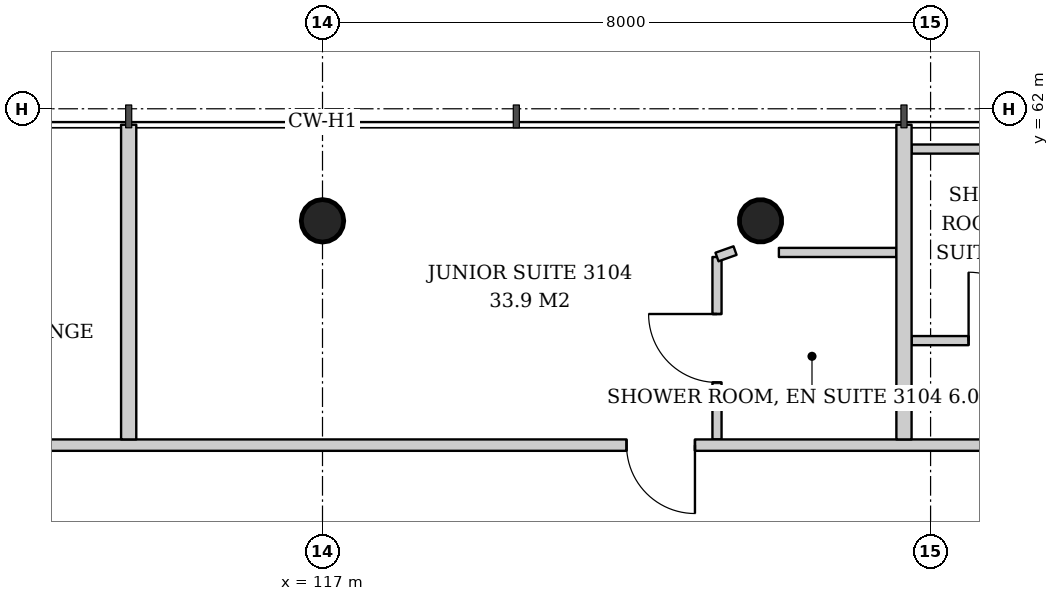
"""IFC4 building model, lengths in metres.
Left out: names, types, materials, properties, quantities, classifications, styles, units other than length and angle.
Written with IfcOpenShell. Run it as: python <this file> out.ifc"""

import sys

from ifc_helpers import new_model, si_unit, direction, frame, frame_2d, origin, origin_2d, place, context, subcontext, project, spatial, rectangle, hollow_circle, extrude, element, fill, save


model = new_model("IFC4")
c1 = context("Model", 3, precision=1e-05, world=origin(), true_north=direction((0.0, 1.0)))
c2 = subcontext(c1, "Body", "Model", "MODEL_VIEW")
j1 = project(units=[si_unit("LENGTHUNIT", "METRE"), si_unit("PLANEANGLEUNIT", "RADIAN")], contexts=[c1])
p1 = place(None, origin())
s1 = spatial("IfcSite", under=j1, at=p1, CompositionType="ELEMENT")
p2 = place(p1, origin())
s2 = spatial("IfcBuilding", under=s1, at=p2, CompositionType="ELEMENT")
p3 = place(p2, frame((0.0, 0.0, 123.6)))
s3 = spatial("IfcBuildingStorey", under=s2, at=p3, CompositionType="ELEMENT", Elevation=123.6)
p4 = place(p3, frame((122.789, 60.578, 0.0), z_axis=(-0.021563230905, -0.043062285527, 0.998839660125), x_axis=(0.894160516368, -0.44774654769, 0.0)))
e1 = element("IfcColumn", 1, at=p4, inside=s3, PredefinedType="COLUMN", context=c2, shape_type="SweptSolid", body=[
    extrude(hollow_circle(Radius=0.28, WallThickness=0.02, at=origin_2d()), origin(), (0.0, 0.0, 1.0), 3.804),
])
p5 = place(p3, frame((117.0, 60.578, 0.0), z_axis=(0.0, -0.043072300418, 0.999071957837), x_axis=(1.0, 0.0, 0.0)))
e2 = element("IfcColumn", 2, at=p5, inside=s3, PredefinedType="COLUMN", context=c2, shape_type="SweptSolid", body=[
    extrude(hollow_circle(Radius=0.28, WallThickness=0.02, at=origin_2d()), origin(), (0.0, 0.0, 1.0), 3.803),
])
p6 = place(p3, frame((124.75, 58.95, 0.0), z_axis=(0.0, 0.0, 1.0), x_axis=(1.0, 0.0, 0.0)))
e3 = element("IfcWall", 3, at=p6, inside=s3, PredefinedType="PARTITIONING", context=c2, shape_type="SweptSolid", body=[
    extrude(rectangle(XDim=2.58, YDim=0.12, at=frame_2d((1.29, 0.0))), origin(), (0.0, 0.0, 1.0), 2.9),
])
p7 = place(p6, frame((0.75, 0.0, 0.0)))
e4 = element("IfcOpeningElement", 4, at=p7, cuts=e3, PredefinedType="OPENING", context=c2, shape_type="SweptSolid", body=[
    extrude(rectangle(XDim=0.9, YDim=2.1, at=frame_2d((0.45, 1.05))), frame((0.0, 0.07, 0.0), z_axis=(0.0, -1.0, 0.0), x_axis=(1.0, 0.0, 0.0)), (0.0, 0.0, 1.0), 0.14),
])
p8 = place(p3, frame((124.75, 61.47, 0.0), z_axis=(0.0, 0.0, 1.0), x_axis=(1.0, 0.0, 0.0)))
e5 = element("IfcWall", 5, at=p8, inside=s3, PredefinedType="PARTITIONING", context=c2, shape_type="SweptSolid", body=[
    extrude(rectangle(XDim=2.58, YDim=0.12, at=frame_2d((1.29, 0.0))), origin(), (0.0, 0.0, 1.0), 3.6),
])
p9 = place(p3, frame((124.55, 60.11, 0.0), z_axis=(0.0, 0.0, 1.0), x_axis=(-1.0, 0.0, 0.0)))
e6 = element("IfcWall", 6, at=p9, inside=s3, PredefinedType="PARTITIONING", context=c2, shape_type="SweptSolid", body=[
    extrude(rectangle(XDim=1.546, YDim=0.12, at=frame_2d((0.773, 0.0))), origin(), (0.0, 0.0, 1.0), 3.6),
])
p10 = place(p3, frame((122.19, 57.65, 0.0), z_axis=(0.0, 0.0, 1.0), x_axis=(0.0, 1.0, 0.0)))
e7 = element("IfcWall", 7, at=p10, inside=s3, PredefinedType="PARTITIONING", context=c2, shape_type="SweptSolid", body=[
    extrude(rectangle(XDim=2.4, YDim=0.12, at=frame_2d((1.2, 0.0))), origin(), (0.0, 0.0, 1.0), 3.0),
])
p11 = place(p10, frame((0.75, 0.0, 0.0)))
e8 = element("IfcOpeningElement", 8, at=p11, cuts=e7, PredefinedType="OPENING", context=c2, shape_type="SweptSolid", body=[
    extrude(rectangle(XDim=0.9, YDim=2.1, at=frame_2d((0.45, 1.05))), frame((0.0, 0.07, 0.0), z_axis=(0.0, -1.0, 0.0), x_axis=(1.0, 0.0, 0.0)), (0.0, 0.0, 1.0), 0.14),
])
p12 = place(p3, frame((127.793, 57.575, 0.0), z_axis=(0.0, 0.0, 1.0), x_axis=(-1.0, 0.0, 0.0)))
e9 = element("IfcWall", 9, at=p12, inside=s3, PredefinedType="PARTITIONING", context=c2, shape_type="SweptSolid", body=[
    extrude(rectangle(XDim=21.586, YDim=0.15, at=frame_2d((10.793, 0.0))), origin(), (0.0, 0.0, 1.0), 2.9),
])
p13 = place(p12, frame((0.718, 0.0, 0.0)))
e10 = element("IfcOpeningElement", 10, at=p13, cuts=e9, PredefinedType="OPENING", context=c2, shape_type="SweptSolid", body=[
    extrude(rectangle(XDim=0.9, YDim=2.1, at=frame_2d((0.45, 1.05))), frame((0.0, 0.085, 0.0), z_axis=(0.0, -1.0, 0.0), x_axis=(1.0, 0.0, 0.0)), (0.0, 0.0, 1.0), 0.17),
])
p14 = place(p12, frame((5.893, 0.0, 0.0)))
e11 = element("IfcOpeningElement", 11, at=p14, cuts=e9, PredefinedType="OPENING", context=c2, shape_type="SweptSolid", body=[
    extrude(rectangle(XDim=0.9, YDim=2.1, at=frame_2d((0.45, 1.05))), frame((0.0, 0.085, 0.0), z_axis=(0.0, -1.0, 0.0), x_axis=(1.0, 0.0, 0.0)), (0.0, 0.0, 1.0), 0.17),
])
p15 = place(p12, frame((16.043, 0.0, 0.0)))
e12 = element("IfcOpeningElement", 12, at=p15, cuts=e9, PredefinedType="OPENING", context=c2, shape_type="SweptSolid", body=[
    extrude(rectangle(XDim=1.0, YDim=2.1, at=frame_2d((0.5, 1.05))), frame((0.0, 0.085, 0.0), z_axis=(0.0, -1.0, 0.0), x_axis=(1.0, 0.0, 0.0)), (0.0, 0.0, 1.0), 0.17),
])
p16 = place(p3, frame((124.65, 57.65, 0.0), z_axis=(0.0, 0.0, 1.0), x_axis=(0.0, 1.0, 0.0)))
e13 = element("IfcWall", 13, at=p16, inside=s3, PredefinedType="PARTITIONING", context=c2, shape_type="SweptSolid", body=[
    extrude(rectangle(XDim=4.14, YDim=0.2, at=frame_2d((2.07, 0.0))), origin(), (0.0, 0.0, 1.0), 3.2),
])
p17 = place(p3, frame((114.45, 57.65, 0.0), z_axis=(0.0, 0.0, 1.0), x_axis=(0.0, 1.0, 0.0)))
e14 = element("IfcWall", 14, at=p17, inside=s3, PredefinedType="PARTITIONING", context=c2, shape_type="SweptSolid", body=[
    extrude(rectangle(XDim=4.14, YDim=0.2, at=frame_2d((2.07, 0.0))), origin(), (0.0, 0.0, 1.0), 3.0),
])
p18 = place(p3, frame((122.19, 60.05, 0.0), z_axis=(0.0, 0.0, 1.0), x_axis=(0.942506501315, 0.33418781393, 0.0)))
e15 = element("IfcWall", 15, at=p18, inside=s3, PredefinedType="PARTITIONING", context=c2, shape_type="SweptSolid", body=[
    extrude(rectangle(XDim=0.252, YDim=0.12, at=frame_2d((0.126, 0.0))), origin(), (0.0, 0.0, 1.0), 3.0),
])
p19 = place(p7, origin())
e16 = element("IfcDoor", 16, at=p19, inside=s3, OperationType="SINGLE_SWING_LEFT", PredefinedType="DOOR", context=c2, shape_type="SweptSolid", body=[
    extrude(rectangle(XDim=0.9, YDim=2.1, at=frame_2d((0.45, 1.05))), frame((0.0, 0.025, 0.0), z_axis=(0.0, -1.0, 0.0), x_axis=(1.0, 0.0, 0.0)), (0.0, 0.0, 1.0), 0.05),
])
fill(e4, e16)
p20 = place(p11, origin())
e17 = element("IfcDoor", 17, at=p20, inside=s3, OperationType="SINGLE_SWING_RIGHT", PredefinedType="DOOR", context=c2, shape_type="SweptSolid", body=[
    extrude(rectangle(XDim=0.9, YDim=2.1, at=frame_2d((0.45, 1.05))), frame((0.0, 0.025, 0.0), z_axis=(0.0, -1.0, 0.0), x_axis=(1.0, 0.0, 0.0)), (0.0, 0.0, 1.0), 0.05),
])
fill(e8, e17)
p21 = place(p14, origin())
e18 = element("IfcDoor", 18, at=p21, inside=s3, OperationType="SINGLE_SWING_LEFT", PredefinedType="DOOR", context=c2, shape_type="SweptSolid", body=[
    extrude(rectangle(XDim=0.9, YDim=2.1, at=frame_2d((0.45, 1.05))), frame((0.0, 0.025, 0.0), z_axis=(0.0, -1.0, 0.0), x_axis=(1.0, 0.0, 0.0)), (0.0, 0.0, 1.0), 0.05),
])
fill(e11, e18)
save(model, sys.argv[1])
